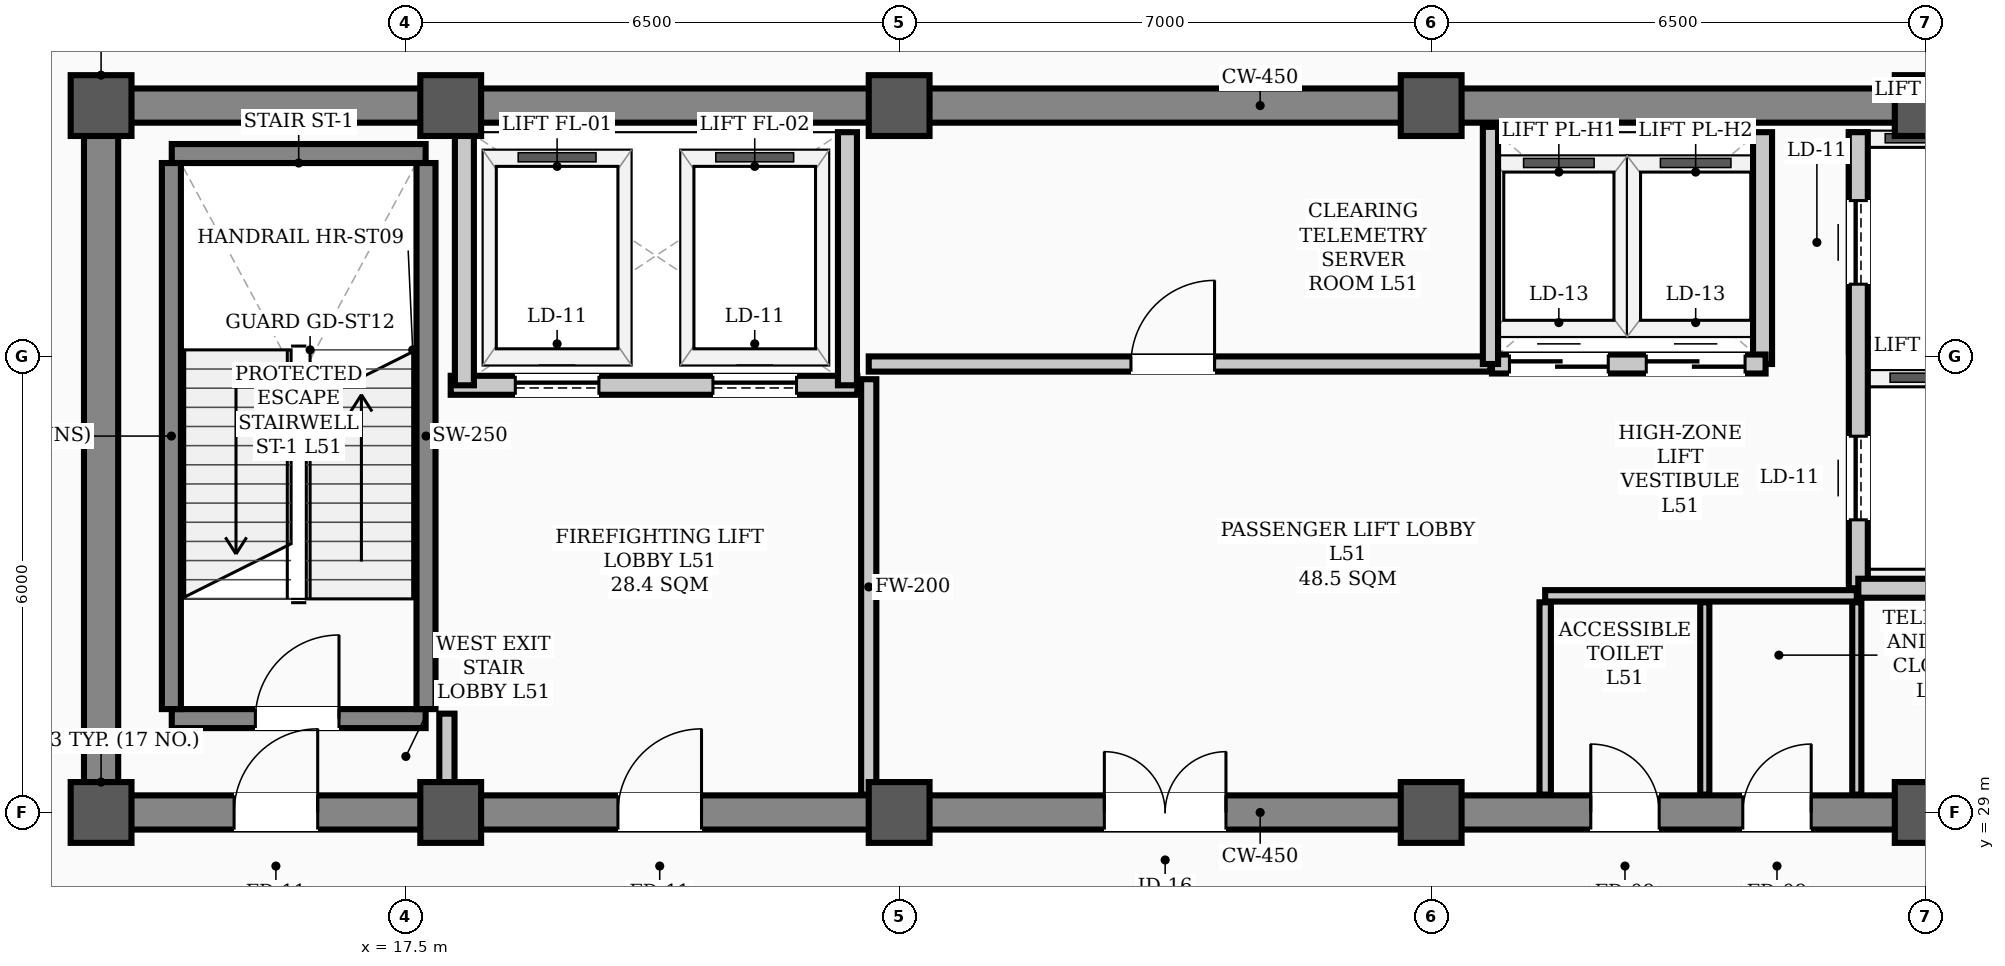
"""IFC4 building model, lengths in metres.
Left out: names, types, materials, properties, quantities, classifications, styles, units other than length and angle.
Written with IfcOpenShell. Run it as: python <this file> out.ifc"""

import sys

from ifc_helpers import new_model, si_unit, direction, frame, frame_2d, origin, origin_2d, place, context, subcontext, project, spatial, rectangle, hollow_rectangle, extrude, element, fill, save


model = new_model("IFC4")
c1 = context("Model", 3, precision=1e-05, world=origin(), true_north=direction((0.0, 1.0)))
c2 = subcontext(c1, "Body", "Model", "MODEL_VIEW")
j1 = project(units=[si_unit("LENGTHUNIT", "METRE"), si_unit("PLANEANGLEUNIT", "RADIAN")], contexts=[c1])
p1 = place(None, origin())
s1 = spatial("IfcSite", under=j1, at=p1, CompositionType="ELEMENT")
p2 = place(p1, origin())
s2 = spatial("IfcBuilding", under=s1, at=p2, CompositionType="ELEMENT")
p3 = place(p2, frame((0.0, 0.0, 206.1)))
s3 = spatial("IfcBuildingStorey", under=s2, at=p3, CompositionType="ELEMENT", Elevation=206.1)
for number, where, z_axis, x_axis in (
    (1, (13.5, 29.0, 0.0), (0.0, 0.0, 1.0), (1.0, 0.0, 0.0)),
    (2, (13.5, 38.3, 0.0), (0.0, 0.0, 1.0), (1.0, 0.0, 0.0)),
    (3, (18.1, 29.0, 0.0), (0.0, 0.0, 1.0), (1.0, 0.0, 0.0)),
    (4, (18.1, 38.3, 0.0), (0.0, 0.0, 1.0), (1.0, 0.0, 0.0)),
    (5, (24.0, 29.0, 0.0), (0.0, 0.0, 1.0), (1.0, 0.0, 0.0)),
    (6, (24.0, 38.3, 0.0), (0.0, 0.0, 1.0), (1.0, 0.0, 0.0)),
    (7, (31.0, 29.0, 0.0), (0.0, 0.0, 1.0), (1.0, 0.0, 0.0)),
    (8, (31.0, 38.3, 0.0), (0.0, 0.0, 1.0), (1.0, 0.0, 0.0)),
    (9, (37.5, 29.0, 0.0), (0.0, 0.0, 1.0), (1.0, 0.0, 0.0)),
    (10, (37.5, 38.3, 0.0), (0.0, 0.0, 1.0), (1.0, 0.0, 0.0)),
):
    element("IfcColumn", number, at=place(p3, frame(where, z_axis=z_axis, x_axis=x_axis)), inside=s3, PredefinedType="COLUMN", context=c2, shape_type="SweptSolid", body=[
        extrude(hollow_rectangle(XDim=0.8, YDim=0.8, WallThickness=0.032, InnerFilletRadius=0.016, OuterFilletRadius=0.048, at=origin_2d()), origin(), (0.0, 0.0, 1.0), 5.0),
    ])
p4 = place(p3, frame((13.5, 29.0, 0.0), z_axis=(0.0, 0.0, 1.0), x_axis=(1.0, 0.0, 0.0)))
e11 = element("IfcWall", 11, at=p4, inside=s3, PredefinedType="SHEAR", context=c2, shape_type="SweptSolid", body=[
    extrude(rectangle(XDim=30.5, YDim=0.45, at=frame_2d((15.25, 0.0))), origin(), (0.0, 0.0, 1.0), 4.82),
])
p5 = place(p4, frame((1.75, 0.0, 0.0)))
e12 = element("IfcOpeningElement", 12, at=p5, cuts=e11, PredefinedType="OPENING", context=c2, shape_type="SweptSolid", body=[
    extrude(rectangle(XDim=1.1, YDim=2.08, at=frame_2d((0.55, 1.04))), frame((0.0, 0.235, 0.0), z_axis=(0.0, -1.0, 0.0), x_axis=(1.0, 0.0, 0.0)), (0.0, 0.0, 1.0), 0.47),
])
p6 = place(p4, frame((26.7, 0.0, 0.0)))
e13 = element("IfcOpeningElement", 13, at=p6, cuts=e11, PredefinedType="OPENING", context=c2, shape_type="SweptSolid", body=[
    extrude(rectangle(XDim=1.1, YDim=2.08, at=frame_2d((0.55, 1.04))), frame((0.0, 0.235, 0.0), z_axis=(0.0, -1.0, 0.0), x_axis=(1.0, 0.0, 0.0)), (0.0, 0.0, 1.0), 0.47),
])
p7 = place(p4, frame((6.8, 0.0, 0.0)))
e14 = element("IfcOpeningElement", 14, at=p7, cuts=e11, PredefinedType="OPENING", context=c2, shape_type="SweptSolid", body=[
    extrude(rectangle(XDim=1.1, YDim=2.08, at=frame_2d((0.55, 1.04))), frame((0.0, 0.235, 0.0), z_axis=(0.0, -1.0, 0.0), x_axis=(1.0, 0.0, 0.0)), (0.0, 0.0, 1.0), 0.47),
])
p8 = place(p4, frame((13.2, 0.0, 0.0)))
e15 = element("IfcOpeningElement", 15, at=p8, cuts=e11, PredefinedType="OPENING", context=c2, shape_type="SweptSolid", body=[
    extrude(rectangle(XDim=1.6, YDim=2.08, at=frame_2d((0.8, 1.04))), frame((0.0, 0.235, 0.0), z_axis=(0.0, -1.0, 0.0), x_axis=(1.0, 0.0, 0.0)), (0.0, 0.0, 1.0), 0.47),
])
p9 = place(p4, frame((19.6, 0.0, 0.0)))
e16 = element("IfcOpeningElement", 16, at=p9, cuts=e11, PredefinedType="OPENING", context=c2, shape_type="SweptSolid", body=[
    extrude(rectangle(XDim=0.9, YDim=2.08, at=frame_2d((0.45, 1.04))), frame((0.0, 0.235, 0.0), z_axis=(0.0, -1.0, 0.0), x_axis=(1.0, 0.0, 0.0)), (0.0, 0.0, 1.0), 0.47),
])
p10 = place(p4, frame((21.6, 0.0, 0.0)))
e17 = element("IfcOpeningElement", 17, at=p10, cuts=e11, PredefinedType="OPENING", context=c2, shape_type="SweptSolid", body=[
    extrude(rectangle(XDim=0.9, YDim=2.08, at=frame_2d((0.45, 1.04))), frame((0.0, 0.235, 0.0), z_axis=(0.0, -1.0, 0.0), x_axis=(1.0, 0.0, 0.0)), (0.0, 0.0, 1.0), 0.47),
])
p11 = place(p3, frame((13.5, 38.3, 0.0), z_axis=(0.0, 0.0, 1.0), x_axis=(1.0, 0.0, 0.0)))
e18 = element("IfcWall", 18, at=p11, inside=s3, PredefinedType="SHEAR", context=c2, shape_type="SweptSolid", body=[
    extrude(rectangle(XDim=30.5, YDim=0.45, at=frame_2d((15.25, 0.0))), origin(), (0.0, 0.0, 1.0), 4.82),
])
p12 = place(p3, frame((13.5, 29.35, 0.0), z_axis=(0.0, 0.0, 1.0), x_axis=(0.0, 1.0, 0.0)))
e19 = element("IfcWall", 19, at=p12, inside=s3, PredefinedType="SHEAR", context=c2, shape_type="SweptSolid", body=[
    extrude(rectangle(XDim=8.6, YDim=0.45, at=frame_2d((4.3, 0.0))), origin(), (0.0, 0.0, 1.0), 4.82),
])
p13 = place(p3, frame((14.43, 30.235, 0.0), z_axis=(0.0, 0.0, 1.0), x_axis=(1.0, 0.0, 0.0)))
e20 = element("IfcWall", 20, at=p13, inside=s3, PredefinedType="STANDARD", context=c2, shape_type="SweptSolid", body=[
    extrude(rectangle(XDim=3.34, YDim=0.25, at=frame_2d((1.67, 0.0))), origin(), (0.0, 0.0, 1.0), 4.82),
])
p14 = place(p13, frame((1.1, 0.0, 0.0)))
e21 = element("IfcOpeningElement", 21, at=p14, cuts=e20, PredefinedType="OPENING", context=c2, shape_type="SweptSolid", body=[
    extrude(rectangle(XDim=1.1, YDim=2.08, at=frame_2d((0.55, 1.04))), frame((0.0, 0.135, 0.0), z_axis=(0.0, -1.0, 0.0), x_axis=(1.0, 0.0, 0.0)), (0.0, 0.0, 1.0), 0.27),
])
p15 = place(p3, frame((14.43, 37.669, 0.0), z_axis=(0.0, 0.0, 1.0), x_axis=(1.0, 0.0, 0.0)))
e22 = element("IfcWall", 22, at=p15, inside=s3, PredefinedType="STANDARD", context=c2, shape_type="SweptSolid", body=[
    extrude(rectangle(XDim=3.34, YDim=0.25, at=frame_2d((1.67, 0.0))), origin(), (0.0, 0.0, 1.0), 4.82),
])
for number, where, z_axis, x_axis in (
    (23, (14.425, 30.36, 0.0), (0.0, 0.0, 1.0), (0.0, 1.0, 0.0)),
    (24, (17.775, 30.36, 0.0), (0.0, 0.0, 1.0), (0.0, 1.0, 0.0)),
):
    element("IfcWall", number, at=place(p3, frame(where, z_axis=z_axis, x_axis=x_axis)), inside=s3, PredefinedType="STANDARD", context=c2, shape_type="SweptSolid", body=[
        extrude(rectangle(XDim=7.184, YDim=0.25, at=frame_2d((3.592, 0.0))), origin(), (0.0, 0.0, 1.0), 4.82),
    ])
p16 = place(p3, frame((18.1, 34.62, 0.0), z_axis=(0.0, 0.0, 1.0), x_axis=(1.0, 0.0, 0.0)))
e25 = element("IfcWall", 25, at=p16, inside=s3, PredefinedType="STANDARD", context=c2, shape_type="SweptSolid", body=[
    extrude(rectangle(XDim=5.35, YDim=0.25, at=frame_2d((2.675, 0.0))), origin(), (0.0, 0.0, 1.0), 4.82),
])
p17 = place(p16, frame((0.85, 0.0, 0.0)))
e26 = element("IfcOpeningElement", 26, at=p17, cuts=e25, PredefinedType="OPENING", context=c2, shape_type="SweptSolid", body=[
    extrude(rectangle(XDim=1.1, YDim=2.08, at=frame_2d((0.55, 1.04))), frame((0.0, 0.135, 0.0), z_axis=(0.0, -1.0, 0.0), x_axis=(1.0, 0.0, 0.0)), (0.0, 0.0, 1.0), 0.27),
])
p18 = place(p16, frame((3.45, 0.0, 0.0)))
e27 = element("IfcOpeningElement", 27, at=p18, cuts=e25, PredefinedType="OPENING", context=c2, shape_type="SweptSolid", body=[
    extrude(rectangle(XDim=1.1, YDim=2.08, at=frame_2d((0.55, 1.04))), frame((0.0, 0.135, 0.0), z_axis=(0.0, -1.0, 0.0), x_axis=(1.0, 0.0, 0.0)), (0.0, 0.0, 1.0), 0.27),
])
p19 = place(p3, frame((36.62, 31.95, 0.0), z_axis=(0.0, 0.0, 1.0), x_axis=(0.0, 1.0, 0.0)))
e28 = element("IfcWall", 28, at=p19, inside=s3, PredefinedType="STANDARD", context=c2, shape_type="SweptSolid", body=[
    extrude(rectangle(XDim=6.0, YDim=0.25, at=frame_2d((3.0, 0.0))), origin(), (0.0, 0.0, 1.0), 4.82),
])
p20 = place(p19, frame((0.9, 0.0, 0.0)))
e29 = element("IfcOpeningElement", 29, at=p20, cuts=e28, PredefinedType="OPENING", context=c2, shape_type="SweptSolid", body=[
    extrude(rectangle(XDim=1.1, YDim=2.08, at=frame_2d((0.55, 1.04))), frame((0.0, 0.135, 0.0), z_axis=(0.0, -1.0, 0.0), x_axis=(1.0, 0.0, 0.0)), (0.0, 0.0, 1.0), 0.27),
])
p21 = place(p19, frame((4.0, 0.0, 0.0)))
e30 = element("IfcOpeningElement", 30, at=p21, cuts=e28, PredefinedType="OPENING", context=c2, shape_type="SweptSolid", body=[
    extrude(rectangle(XDim=1.1, YDim=2.08, at=frame_2d((0.55, 1.04))), frame((0.0, 0.135, 0.0), z_axis=(0.0, -1.0, 0.0), x_axis=(1.0, 0.0, 0.0)), (0.0, 0.0, 1.0), 0.27),
])
p22 = place(p3, frame((36.62, 31.95, 0.0), z_axis=(0.0, 0.0, 1.0), x_axis=(1.0, 0.0, 0.0)))
e31 = element("IfcWall", 31, at=p22, inside=s3, PredefinedType="STANDARD", context=c2, shape_type="SweptSolid", body=[
    extrude(rectangle(XDim=1.9, YDim=0.25, at=frame_2d((0.95, 0.0))), origin(), (0.0, 0.0, 1.0), 4.58),
])
for number, where, z_axis, x_axis in (
    (32, (18.28, 34.62, 0.0), (0.0, 0.0, 1.0), (0.0, 1.0, 0.0)),
    (33, (23.32, 34.62, 0.0), (0.0, 0.0, 1.0), (0.0, 1.0, 0.0)),
):
    element("IfcWall", number, at=place(p3, frame(where, z_axis=z_axis, x_axis=x_axis)), inside=s3, PredefinedType="STANDARD", context=c2, shape_type="SweptSolid", body=[
        extrude(rectangle(XDim=3.33, YDim=0.25, at=frame_2d((1.665, 0.0))), origin(), (0.0, 0.0, 1.0), 4.82),
    ])
p23 = place(p3, frame((35.36, 34.9, 0.0), z_axis=(0.0, 0.0, 1.0), x_axis=(0.0, 1.0, 0.0)))
e34 = element("IfcWall", 34, at=p23, inside=s3, PredefinedType="STANDARD", context=c2, shape_type="SweptSolid", body=[
    extrude(rectangle(XDim=3.05, YDim=0.25, at=frame_2d((1.525, 0.0))), origin(), (0.0, 0.0, 1.0), 4.82),
])
p24 = place(p3, frame((31.8, 34.9, 0.0), z_axis=(0.0, 0.0, 1.0), x_axis=(1.0, 0.0, 0.0)))
e35 = element("IfcWall", 35, at=p24, inside=s3, PredefinedType="STANDARD", context=c2, shape_type="SweptSolid", body=[
    extrude(rectangle(XDim=3.6, YDim=0.25, at=frame_2d((1.8, 0.0))), origin(), (0.0, 0.0, 1.0), 4.82),
])
p25 = place(p24, frame((0.23, 0.0, 0.0)))
e36 = element("IfcOpeningElement", 36, at=p25, cuts=e35, PredefinedType="OPENING", context=c2, shape_type="SweptSolid", body=[
    extrude(rectangle(XDim=1.3, YDim=2.08, at=frame_2d((0.65, 1.04))), frame((0.0, 0.135, 0.0), z_axis=(0.0, -1.0, 0.0), x_axis=(1.0, 0.0, 0.0)), (0.0, 0.0, 1.0), 0.27),
])
p26 = place(p24, frame((2.03, 0.0, 0.0)))
e37 = element("IfcOpeningElement", 37, at=p26, cuts=e35, PredefinedType="OPENING", context=c2, shape_type="SweptSolid", body=[
    extrude(rectangle(XDim=1.3, YDim=2.08, at=frame_2d((0.65, 1.04))), frame((0.0, 0.135, 0.0), z_axis=(0.0, -1.0, 0.0), x_axis=(1.0, 0.0, 0.0)), (0.0, 0.0, 1.0), 0.27),
])
p27 = place(p3, frame((23.6, 34.9, 0.0), z_axis=(0.0, 0.0, 1.0), x_axis=(1.0, 0.0, 0.0)))
e38 = element("IfcWall", 38, at=p27, inside=s3, PredefinedType="STANDARD", context=c2, shape_type="SweptSolid", body=[
    extrude(rectangle(XDim=8.18, YDim=0.2, at=frame_2d((4.09, 0.0))), origin(), (0.0, 0.0, 1.0), 4.82),
])
p28 = place(p27, frame((3.45, 0.0, 0.0)))
e39 = element("IfcOpeningElement", 39, at=p28, cuts=e38, PredefinedType="OPENING", context=c2, shape_type="SweptSolid", body=[
    extrude(rectangle(XDim=1.1, YDim=2.08, at=frame_2d((0.55, 1.04))), frame((0.0, 0.11, 0.0), z_axis=(0.0, -1.0, 0.0), x_axis=(1.0, 0.0, 0.0)), (0.0, 0.0, 1.0), 0.22),
])
p29 = place(p3, frame((32.5, 31.85, 0.0), z_axis=(0.0, 0.0, 1.0), x_axis=(1.0, 0.0, 0.0)))
e40 = element("IfcWall", 40, at=p29, inside=s3, PredefinedType="PARTITIONING", context=c2, shape_type="SweptSolid", body=[
    extrude(rectangle(XDim=4.1, YDim=0.15, at=frame_2d((2.05, 0.0))), origin(), (0.0, 0.0, 1.0), 4.82),
])
p30 = place(p3, frame((18.05, 29.235, 0.0), z_axis=(0.0, 0.0, 1.0), x_axis=(0.0, 1.0, 0.0)))
e41 = element("IfcWall", 41, at=p30, inside=s3, PredefinedType="STANDARD", context=c2, shape_type="SweptSolid", body=[
    extrude(rectangle(XDim=1.065, YDim=0.2, at=frame_2d((0.532, 0.0))), origin(), (0.0, 0.0, 1.0), 4.45),
])
p31 = place(p3, frame((23.6, 29.235, 0.0), z_axis=(0.0, 0.0, 1.0), x_axis=(0.0, 1.0, 0.0)))
e42 = element("IfcWall", 42, at=p31, inside=s3, PredefinedType="STANDARD", context=c2, shape_type="SweptSolid", body=[
    extrude(rectangle(XDim=5.465, YDim=0.2, at=frame_2d((2.732, 0.0))), origin(), (0.0, 0.0, 1.0), 4.3),
])
p32 = place(p3, frame((32.5, 29.235, 0.0), z_axis=(0.0, 0.0, 1.0), x_axis=(0.0, 1.0, 0.0)))
e43 = element("IfcWall", 43, at=p32, inside=s3, PredefinedType="PARTITIONING", context=c2, shape_type="SweptSolid", body=[
    extrude(rectangle(XDim=2.53, YDim=0.15, at=frame_2d((1.265, 0.0))), origin(), (0.0, 0.0, 1.0), 4.45),
])
for number, where, z_axis, x_axis in (
    (44, (36.6, 29.235, 0.0), (0.0, 0.0, 1.0), (0.0, 1.0, 0.0)),
    (45, (34.6, 29.235, 0.0), (0.0, 0.0, 1.0), (0.0, 1.0, 0.0)),
):
    element("IfcWall", number, at=place(p3, frame(where, z_axis=z_axis, x_axis=x_axis)), inside=s3, PredefinedType="PARTITIONING", context=c2, shape_type="SweptSolid", body=[
        extrude(rectangle(XDim=2.53, YDim=0.12, at=frame_2d((1.265, 0.0))), origin(), (0.0, 0.0, 1.0), 4.45),
    ])
p33 = place(p3, frame((31.78, 34.9, 0.0), z_axis=(0.0, 0.0, 1.0), x_axis=(0.0, 1.0, 0.0)))
e46 = element("IfcWall", 46, at=p33, inside=s3, PredefinedType="STANDARD", context=c2, shape_type="SweptSolid", body=[
    extrude(rectangle(XDim=3.12, YDim=0.2, at=frame_2d((1.56, 0.0))), origin(), (0.0, 0.0, 1.0), 4.82),
])
p34 = place(p14, origin())
e47 = element("IfcDoor", 47, at=p34, inside=s3, OperationType="SINGLE_SWING_RIGHT", PredefinedType="DOOR", context=c2, shape_type="SweptSolid", body=[
    extrude(rectangle(XDim=1.1, YDim=2.08, at=frame_2d((0.55, 1.04))), frame((0.0, 0.025, 0.0), z_axis=(0.0, -1.0, 0.0), x_axis=(1.0, 0.0, 0.0)), (0.0, 0.0, 1.0), 0.05),
])
fill(e21, e47)
p35 = place(p5, origin())
e48 = element("IfcDoor", 48, at=p35, inside=s3, OperationType="SINGLE_SWING_RIGHT", PredefinedType="DOOR", context=c2, shape_type="SweptSolid", body=[
    extrude(rectangle(XDim=1.1, YDim=2.08, at=frame_2d((0.55, 1.04))), frame((0.0, 0.025, 0.0), z_axis=(0.0, -1.0, 0.0), x_axis=(1.0, 0.0, 0.0)), (0.0, 0.0, 1.0), 0.05),
])
fill(e12, e48)
p36 = place(p7, origin())
e49 = element("IfcDoor", 49, at=p36, inside=s3, OperationType="SINGLE_SWING_RIGHT", PredefinedType="DOOR", context=c2, shape_type="SweptSolid", body=[
    extrude(rectangle(XDim=1.1, YDim=2.08, at=frame_2d((0.55, 1.04))), frame((0.0, 0.025, 0.0), z_axis=(0.0, -1.0, 0.0), x_axis=(1.0, 0.0, 0.0)), (0.0, 0.0, 1.0), 0.05),
])
fill(e14, e49)
p37 = place(p8, origin())
e50 = element("IfcDoor", 50, at=p37, inside=s3, OperationType="DOUBLE_DOOR_SINGLE_SWING", PredefinedType="DOOR", context=c2, shape_type="SweptSolid", body=[
    extrude(rectangle(XDim=1.6, YDim=2.08, at=frame_2d((0.8, 1.04))), frame((0.0, 0.025, 0.0), z_axis=(0.0, -1.0, 0.0), x_axis=(1.0, 0.0, 0.0)), (0.0, 0.0, 1.0), 0.05),
])
fill(e15, e50)
p38 = place(p28, origin())
e51 = element("IfcDoor", 51, at=p38, inside=s3, OperationType="SINGLE_SWING_RIGHT", PredefinedType="DOOR", context=c2, shape_type="SweptSolid", body=[
    extrude(rectangle(XDim=1.1, YDim=2.08, at=frame_2d((0.55, 1.04))), frame((0.0, 0.025, 0.0), z_axis=(0.0, -1.0, 0.0), x_axis=(1.0, 0.0, 0.0)), (0.0, 0.0, 1.0), 0.05),
])
fill(e39, e51)
p39 = place(p9, origin())
e52 = element("IfcDoor", 52, at=p39, inside=s3, OperationType="SINGLE_SWING_LEFT", PredefinedType="DOOR", context=c2, shape_type="SweptSolid", body=[
    extrude(rectangle(XDim=0.9, YDim=2.08, at=frame_2d((0.45, 1.04))), frame((0.0, 0.025, 0.0), z_axis=(0.0, -1.0, 0.0), x_axis=(1.0, 0.0, 0.0)), (0.0, 0.0, 1.0), 0.05),
])
fill(e16, e52)
p40 = place(p10, origin())
e53 = element("IfcDoor", 53, at=p40, inside=s3, OperationType="SINGLE_SWING_RIGHT", PredefinedType="DOOR", context=c2, shape_type="SweptSolid", body=[
    extrude(rectangle(XDim=0.9, YDim=2.08, at=frame_2d((0.45, 1.04))), frame((0.0, 0.025, 0.0), z_axis=(0.0, -1.0, 0.0), x_axis=(1.0, 0.0, 0.0)), (0.0, 0.0, 1.0), 0.05),
])
fill(e17, e53)
p41 = place(p17, origin())
e54 = element("IfcDoor", 54, at=p41, inside=s3, OperationType="SLIDING_TO_LEFT", PredefinedType="DOOR", context=c2, shape_type="SweptSolid", body=[
    extrude(rectangle(XDim=1.1, YDim=2.08, at=frame_2d((0.55, 1.04))), frame((0.0, 0.025, 0.0), z_axis=(0.0, -1.0, 0.0), x_axis=(1.0, 0.0, 0.0)), (0.0, 0.0, 1.0), 0.05),
])
fill(e26, e54)
p42 = place(p18, origin())
e55 = element("IfcDoor", 55, at=p42, inside=s3, OperationType="SLIDING_TO_LEFT", PredefinedType="DOOR", context=c2, shape_type="SweptSolid", body=[
    extrude(rectangle(XDim=1.1, YDim=2.08, at=frame_2d((0.55, 1.04))), frame((0.0, 0.025, 0.0), z_axis=(0.0, -1.0, 0.0), x_axis=(1.0, 0.0, 0.0)), (0.0, 0.0, 1.0), 0.05),
])
fill(e27, e55)
p43 = place(p20, origin())
e56 = element("IfcDoor", 56, at=p43, inside=s3, OperationType="SLIDING_TO_LEFT", PredefinedType="DOOR", context=c2, shape_type="SweptSolid", body=[
    extrude(rectangle(XDim=1.1, YDim=2.08, at=frame_2d((0.55, 1.04))), frame((0.0, 0.025, 0.0), z_axis=(0.0, -1.0, 0.0), x_axis=(1.0, 0.0, 0.0)), (0.0, 0.0, 1.0), 0.05),
])
fill(e29, e56)
p44 = place(p21, origin())
e57 = element("IfcDoor", 57, at=p44, inside=s3, OperationType="SLIDING_TO_LEFT", PredefinedType="DOOR", context=c2, shape_type="SweptSolid", body=[
    extrude(rectangle(XDim=1.1, YDim=2.08, at=frame_2d((0.55, 1.04))), frame((0.0, 0.025, 0.0), z_axis=(0.0, -1.0, 0.0), x_axis=(1.0, 0.0, 0.0)), (0.0, 0.0, 1.0), 0.05),
])
fill(e30, e57)
p45 = place(p25, origin())
e58 = element("IfcDoor", 58, at=p45, inside=s3, OperationType="DOUBLE_DOOR_SLIDING", PredefinedType="DOOR", context=c2, shape_type="SweptSolid", body=[
    extrude(rectangle(XDim=1.3, YDim=2.08, at=frame_2d((0.65, 1.04))), frame((0.0, 0.025, 0.0), z_axis=(0.0, -1.0, 0.0), x_axis=(1.0, 0.0, 0.0)), (0.0, 0.0, 1.0), 0.05),
])
fill(e36, e58)
p46 = place(p26, origin())
e59 = element("IfcDoor", 59, at=p46, inside=s3, OperationType="DOUBLE_DOOR_SLIDING", PredefinedType="DOOR", context=c2, shape_type="SweptSolid", body=[
    extrude(rectangle(XDim=1.3, YDim=2.08, at=frame_2d((0.65, 1.04))), frame((0.0, 0.025, 0.0), z_axis=(0.0, -1.0, 0.0), x_axis=(1.0, 0.0, 0.0)), (0.0, 0.0, 1.0), 0.05),
])
fill(e37, e59)
save(model, sys.argv[1])
